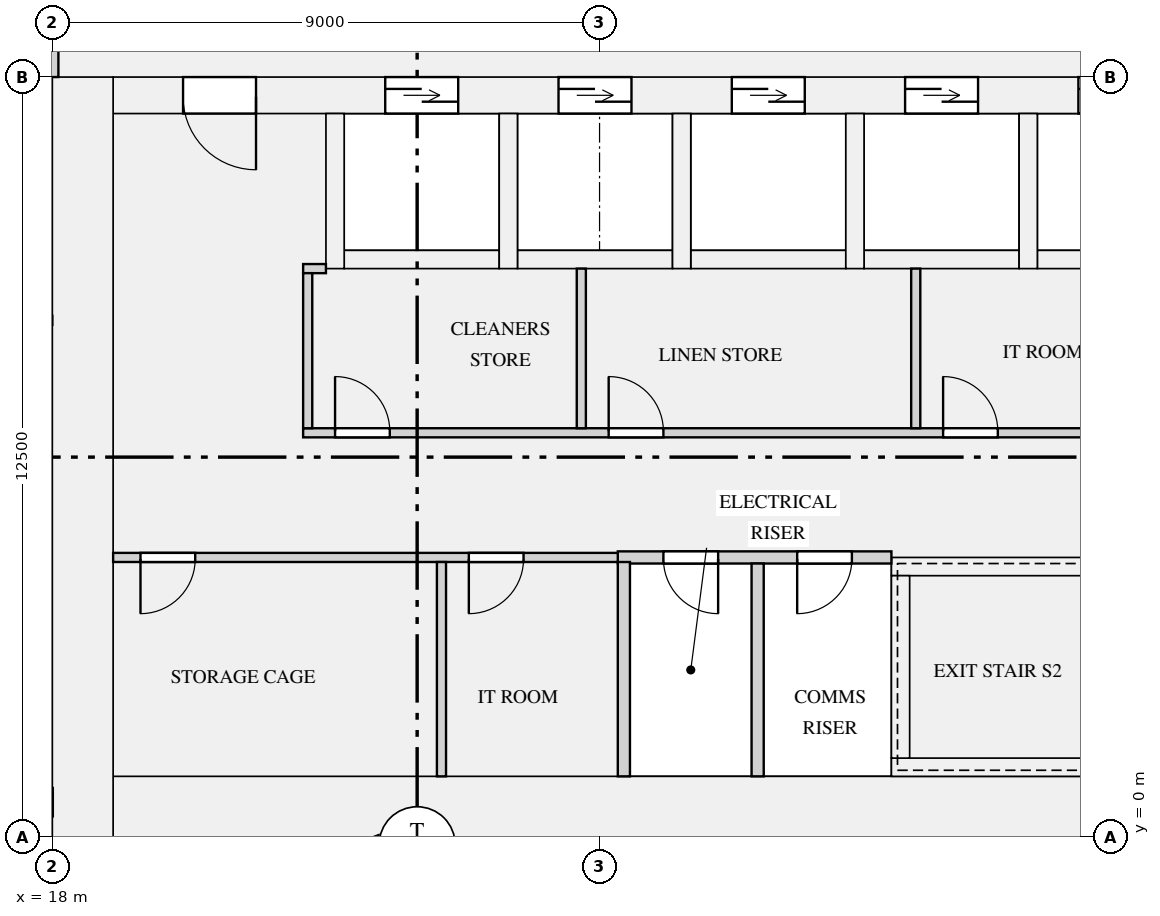
"""IFC4 building model, lengths in metres.
Left out: names, types, materials, properties, quantities, classifications, styles, units other than length and angle.
Written with IfcOpenShell. Run it as: python <this file> out.ifc"""

import sys

from ifc_helpers import new_model, si_unit, direction, frame, frame_2d, origin, place, context, subcontext, project, spatial, rectangle, extrude, element, fill, save


model = new_model("IFC4")
c1 = context("Model", 3, precision=1e-05, world=origin(), true_north=direction((0.0, 1.0)))
c2 = subcontext(c1, "Body", "Model", "MODEL_VIEW")
j1 = project(units=[si_unit("LENGTHUNIT", "METRE"), si_unit("PLANEANGLEUNIT", "RADIAN")], contexts=[c1])
p1 = place(None, origin())
s1 = spatial("IfcSite", under=j1, at=p1, CompositionType="ELEMENT")
p2 = place(p1, origin())
s2 = spatial("IfcBuilding", under=s1, at=p2, CompositionType="ELEMENT")
p3 = place(p2, frame((0.0, 0.0, 28.95)))
s3 = spatial("IfcBuildingStorey", under=s2, at=p3, CompositionType="ELEMENT", Elevation=28.95)
p4 = place(p3, frame((18.5, 0.0, 0.0), z_axis=(0.0, 0.0, 1.0), x_axis=(0.0, 1.0, 0.0)))
e1 = element("IfcWall", 1, at=p4, inside=s3, PredefinedType="SHEAR", context=c2, shape_type="SweptSolid", body=[
    extrude(rectangle(XDim=12.5, YDim=1.0, at=frame_2d((6.25, 0.0))), origin(), (0.0, 0.0, 1.0), 3.15),
])
p5 = place(p3, frame((19.0, 0.5, 0.0), z_axis=(0.0, 0.0, 1.0), x_axis=(1.0, 0.0, 0.0)))
e2 = element("IfcWall", 2, at=p5, inside=s3, PredefinedType="SHEAR", context=c2, shape_type="SweptSolid", body=[
    extrude(rectangle(XDim=34.0, YDim=1.0, at=frame_2d((17.0, 0.0))), origin(), (0.0, 0.0, 1.0), 3.15),
])
p6 = place(p3, frame((19.0, 12.2, 0.0), z_axis=(0.0, 0.0, 1.0), x_axis=(1.0, 0.0, 0.0)))
e3 = element("IfcWall", 3, at=p6, inside=s3, PredefinedType="SHEAR", context=c2, shape_type="SweptSolid", body=[
    extrude(rectangle(XDim=34.0, YDim=0.6, at=frame_2d((17.0, 0.0))), origin(), (0.0, 0.0, 1.0), 3.15),
])
p7 = place(p6, frame((4.475, 0.0, 0.0)))
e4 = element("IfcOpeningElement", 4, at=p7, cuts=e3, PredefinedType="OPENING", context=c2, shape_type="SweptSolid", body=[
    extrude(rectangle(XDim=1.2, YDim=2.1, at=frame_2d((0.6, 1.05))), frame((0.0, 0.31, 0.0), z_axis=(0.0, -1.0, 0.0), x_axis=(1.0, 0.0, 0.0)), (0.0, 0.0, 1.0), 0.62),
])
p8 = place(p6, frame((7.325, 0.0, 0.0)))
e5 = element("IfcOpeningElement", 5, at=p8, cuts=e3, PredefinedType="OPENING", context=c2, shape_type="SweptSolid", body=[
    extrude(rectangle(XDim=1.2, YDim=2.1, at=frame_2d((0.6, 1.05))), frame((0.0, 0.31, 0.0), z_axis=(0.0, -1.0, 0.0), x_axis=(1.0, 0.0, 0.0)), (0.0, 0.0, 1.0), 0.62),
])
p9 = place(p6, frame((10.175, 0.0, 0.0)))
e6 = element("IfcOpeningElement", 6, at=p9, cuts=e3, PredefinedType="OPENING", context=c2, shape_type="SweptSolid", body=[
    extrude(rectangle(XDim=1.2, YDim=2.1, at=frame_2d((0.6, 1.05))), frame((0.0, 0.31, 0.0), z_axis=(0.0, -1.0, 0.0), x_axis=(1.0, 0.0, 0.0)), (0.0, 0.0, 1.0), 0.62),
])
p10 = place(p6, frame((13.025, 0.0, 0.0)))
e7 = element("IfcOpeningElement", 7, at=p10, cuts=e3, PredefinedType="OPENING", context=c2, shape_type="SweptSolid", body=[
    extrude(rectangle(XDim=1.2, YDim=2.1, at=frame_2d((0.6, 1.05))), frame((0.0, 0.31, 0.0), z_axis=(0.0, -1.0, 0.0), x_axis=(1.0, 0.0, 0.0)), (0.0, 0.0, 1.0), 0.62),
])
p11 = place(p6, frame((15.875, 0.0, 0.0)))
e8 = element("IfcOpeningElement", 8, at=p11, cuts=e3, PredefinedType="OPENING", context=c2, shape_type="SweptSolid", body=[
    extrude(rectangle(XDim=1.2, YDim=2.1, at=frame_2d((0.6, 1.05))), frame((0.0, 0.31, 0.0), z_axis=(0.0, -1.0, 0.0), x_axis=(1.0, 0.0, 0.0)), (0.0, 0.0, 1.0), 0.62),
])
p12 = place(p6, frame((24.175, 0.0, 0.0)))
e9 = element("IfcOpeningElement", 9, at=p12, cuts=e3, PredefinedType="OPENING", context=c2, shape_type="SweptSolid", body=[
    extrude(rectangle(XDim=1.1, YDim=2.1, at=frame_2d((0.55, 1.05))), frame((0.0, 0.31, 0.0), z_axis=(0.0, -1.0, 0.0), x_axis=(1.0, 0.0, 0.0)), (0.0, 0.0, 1.0), 0.62),
])
p13 = place(p6, frame((26.425, 0.0, 0.0)))
e10 = element("IfcOpeningElement", 10, at=p13, cuts=e3, PredefinedType="OPENING", context=c2, shape_type="SweptSolid", body=[
    extrude(rectangle(XDim=1.1, YDim=2.1, at=frame_2d((0.55, 1.05))), frame((0.0, 0.31, 0.0), z_axis=(0.0, -1.0, 0.0), x_axis=(1.0, 0.0, 0.0)), (0.0, 0.0, 1.0), 0.62),
])
p14 = place(p6, frame((28.675, 0.0, 0.0)))
e11 = element("IfcOpeningElement", 11, at=p14, cuts=e3, PredefinedType="OPENING", context=c2, shape_type="SweptSolid", body=[
    extrude(rectangle(XDim=1.1, YDim=2.1, at=frame_2d((0.55, 1.05))), frame((0.0, 0.31, 0.0), z_axis=(0.0, -1.0, 0.0), x_axis=(1.0, 0.0, 0.0)), (0.0, 0.0, 1.0), 0.62),
])
p15 = place(p6, frame((1.15, 0.0, 0.0)))
e12 = element("IfcOpeningElement", 12, at=p15, cuts=e3, PredefinedType="OPENING", context=c2, shape_type="SweptSolid", body=[
    extrude(rectangle(XDim=1.2, YDim=2.1, at=frame_2d((0.6, 1.05))), frame((0.0, 0.31, 0.0), z_axis=(0.0, -1.0, 0.0), x_axis=(1.0, 0.0, 0.0)), (0.0, 0.0, 1.0), 0.62),
])
p16 = place(p6, frame((31.65, 0.0, 0.0)))
e13 = element("IfcOpeningElement", 13, at=p16, cuts=e3, PredefinedType="OPENING", context=c2, shape_type="SweptSolid", body=[
    extrude(rectangle(XDim=1.2, YDim=2.1, at=frame_2d((0.6, 1.05))), frame((0.0, 0.31, 0.0), z_axis=(0.0, -1.0, 0.0), x_axis=(1.0, 0.0, 0.0)), (0.0, 0.0, 1.0), 0.62),
])
p17 = place(p3, frame((22.8, 9.5, 0.0), z_axis=(0.0, 0.0, 1.0), x_axis=(1.0, 0.0, 0.0)))
e14 = element("IfcWall", 14, at=p17, inside=s3, PredefinedType="SHEAR", context=c2, shape_type="SweptSolid", body=[
    extrude(rectangle(XDim=2.55, YDim=0.3, at=frame_2d((1.275, 0.0))), origin(), (0.0, 0.0, 1.0), 3.15),
])
p18 = place(p3, frame((22.65, 9.35, 0.0), z_axis=(0.0, 0.0, 1.0), x_axis=(0.0, 1.0, 0.0)))
e15 = element("IfcWall", 15, at=p18, inside=s3, PredefinedType="SHEAR", context=c2, shape_type="SweptSolid", body=[
    extrude(rectangle(XDim=2.55, YDim=0.3, at=frame_2d((1.275, 0.0))), origin(), (0.0, 0.0, 1.0), 3.15),
])
p19 = place(p3, frame((25.65, 9.5, 0.0), z_axis=(0.0, 0.0, 1.0), x_axis=(1.0, 0.0, 0.0)))
e16 = element("IfcWall", 16, at=p19, inside=s3, PredefinedType="SHEAR", context=c2, shape_type="SweptSolid", body=[
    extrude(rectangle(XDim=2.55, YDim=0.3, at=frame_2d((1.275, 0.0))), origin(), (0.0, 0.0, 1.0), 3.15),
])
p20 = place(p3, frame((25.5, 9.35, 0.0), z_axis=(0.0, 0.0, 1.0), x_axis=(0.0, 1.0, 0.0)))
e17 = element("IfcWall", 17, at=p20, inside=s3, PredefinedType="SHEAR", context=c2, shape_type="SweptSolid", body=[
    extrude(rectangle(XDim=2.55, YDim=0.3, at=frame_2d((1.275, 0.0))), origin(), (0.0, 0.0, 1.0), 3.15),
])
p21 = place(p3, frame((28.5, 9.5, 0.0), z_axis=(0.0, 0.0, 1.0), x_axis=(1.0, 0.0, 0.0)))
e18 = element("IfcWall", 18, at=p21, inside=s3, PredefinedType="SHEAR", context=c2, shape_type="SweptSolid", body=[
    extrude(rectangle(XDim=2.55, YDim=0.3, at=frame_2d((1.275, 0.0))), origin(), (0.0, 0.0, 1.0), 3.15),
])
for number, where, z_axis, x_axis in (
    (19, (28.35, 9.35, 0.0), (0.0, 0.0, 1.0), (0.0, 1.0, 0.0)),
    (20, (31.35, 9.5, 0.0), (0.0, 0.0, 1.0), (1.0, 0.0, 0.0)),
    (21, (31.2, 9.35, 0.0), (0.0, 0.0, 1.0), (0.0, 1.0, 0.0)),
):
    element("IfcWall", number, at=place(p3, frame(where, z_axis=z_axis, x_axis=x_axis)), inside=s3, PredefinedType="SHEAR", context=c2, shape_type="SweptSolid", body=[
        extrude(rectangle(XDim=2.55, YDim=0.3, at=frame_2d((1.275, 0.0))), origin(), (0.0, 0.0, 1.0), 3.15),
    ])
p22 = place(p3, frame((34.2, 9.5, 0.0), z_axis=(0.0, 0.0, 1.0), x_axis=(1.0, 0.0, 0.0)))
e22 = element("IfcWall", 22, at=p22, inside=s3, PredefinedType="SHEAR", context=c2, shape_type="SweptSolid", body=[
    extrude(rectangle(XDim=2.55, YDim=0.3, at=frame_2d((1.275, 0.0))), origin(), (0.0, 0.0, 1.0), 3.15),
])
p23 = place(p3, frame((34.05, 9.35, 0.0), z_axis=(0.0, 0.0, 1.0), x_axis=(0.0, 1.0, 0.0)))
e23 = element("IfcWall", 23, at=p23, inside=s3, PredefinedType="SHEAR", context=c2, shape_type="SweptSolid", body=[
    extrude(rectangle(XDim=2.55, YDim=0.3, at=frame_2d((1.275, 0.0))), origin(), (0.0, 0.0, 1.0), 3.15),
])
p24 = place(p3, frame((31.8, 1.15, 0.0), z_axis=(0.0, 0.0, 1.0), x_axis=(1.0, 0.0, 0.0)))
e24 = element("IfcWall", 24, at=p24, inside=s3, PredefinedType="SHEAR", context=c2, shape_type="SweptSolid", body=[
    extrude(rectangle(XDim=8.4, YDim=0.3, at=frame_2d((4.2, 0.0))), origin(), (0.0, 0.0, 1.0), 3.15),
])
p25 = place(p3, frame((31.8, 4.45, 0.0), z_axis=(0.0, 0.0, 1.0), x_axis=(1.0, 0.0, 0.0)))
e25 = element("IfcWall", 25, at=p25, inside=s3, PredefinedType="SHEAR", context=c2, shape_type="SweptSolid", body=[
    extrude(rectangle(XDim=8.4, YDim=0.3, at=frame_2d((4.2, 0.0))), origin(), (0.0, 0.0, 1.0), 3.15),
])
p26 = place(p25, frame((6.8, 0.0, 0.0)))
e26 = element("IfcOpeningElement", 26, at=p26, cuts=e25, PredefinedType="OPENING", context=c2, shape_type="SweptSolid", body=[
    extrude(rectangle(XDim=1.1, YDim=2.1, at=frame_2d((0.55, 1.05))), frame((0.0, 0.16, 0.0), z_axis=(0.0, -1.0, 0.0), x_axis=(1.0, 0.0, 0.0)), (0.0, 0.0, 1.0), 0.32),
])
p27 = place(p3, frame((31.95, 1.3, 0.0), z_axis=(0.0, 0.0, 1.0), x_axis=(0.0, 1.0, 0.0)))
e27 = element("IfcWall", 27, at=p27, inside=s3, PredefinedType="SHEAR", context=c2, shape_type="SweptSolid", body=[
    extrude(rectangle(XDim=3.0, YDim=0.3, at=frame_2d((1.5, 0.0))), origin(), (0.0, 0.0, 1.0), 3.15),
])
p28 = place(p3, frame((27.3, 4.6, 0.0), z_axis=(0.0, 0.0, 1.0), x_axis=(1.0, 0.0, 0.0)))
e28 = element("IfcWall", 28, at=p28, inside=s3, PredefinedType="PARTITIONING", context=c2, shape_type="SweptSolid", body=[
    extrude(rectangle(XDim=4.5, YDim=0.2, at=frame_2d((2.25, 0.0))), origin(), (0.0, 0.0, 1.0), 2.83),
])
p29 = place(p28, frame((0.75, 0.0, 0.0)))
e29 = element("IfcOpeningElement", 29, at=p29, cuts=e28, PredefinedType="OPENING", context=c2, shape_type="SweptSolid", body=[
    extrude(rectangle(XDim=0.9, YDim=2.1, at=frame_2d((0.45, 1.05))), frame((0.0, 0.11, 0.0), z_axis=(0.0, -1.0, 0.0), x_axis=(1.0, 0.0, 0.0)), (0.0, 0.0, 1.0), 0.22),
])
p30 = place(p28, frame((2.95, 0.0, 0.0)))
e30 = element("IfcOpeningElement", 30, at=p30, cuts=e28, PredefinedType="OPENING", context=c2, shape_type="SweptSolid", body=[
    extrude(rectangle(XDim=0.9, YDim=2.1, at=frame_2d((0.45, 1.05))), frame((0.0, 0.11, 0.0), z_axis=(0.0, -1.0, 0.0), x_axis=(1.0, 0.0, 0.0)), (0.0, 0.0, 1.0), 0.22),
])
p31 = place(p3, frame((19.0, 4.6, 0.0), z_axis=(0.0, 0.0, 1.0), x_axis=(1.0, 0.0, 0.0)))
e31 = element("IfcWall", 31, at=p31, inside=s3, PredefinedType="PARTITIONING", context=c2, shape_type="SweptSolid", body=[
    extrude(rectangle(XDim=8.3, YDim=0.15, at=frame_2d((4.15, 0.0))), origin(), (0.0, 0.0, 1.0), 2.83),
])
p32 = place(p31, frame((0.45, 0.0, 0.0)))
e32 = element("IfcOpeningElement", 32, at=p32, cuts=e31, PredefinedType="OPENING", context=c2, shape_type="SweptSolid", body=[
    extrude(rectangle(XDim=0.9, YDim=2.1, at=frame_2d((0.45, 1.05))), frame((0.0, 0.085, 0.0), z_axis=(0.0, -1.0, 0.0), x_axis=(1.0, 0.0, 0.0)), (0.0, 0.0, 1.0), 0.17),
])
p33 = place(p31, frame((5.85, 0.0, 0.0)))
e33 = element("IfcOpeningElement", 33, at=p33, cuts=e31, PredefinedType="OPENING", context=c2, shape_type="SweptSolid", body=[
    extrude(rectangle(XDim=0.9, YDim=2.1, at=frame_2d((0.45, 1.05))), frame((0.0, 0.085, 0.0), z_axis=(0.0, -1.0, 0.0), x_axis=(1.0, 0.0, 0.0)), (0.0, 0.0, 1.0), 0.17),
])
p34 = place(p3, frame((22.125, 6.65, 0.0), z_axis=(0.0, 0.0, 1.0), x_axis=(1.0, 0.0, 0.0)))
e34 = element("IfcWall", 34, at=p34, inside=s3, PredefinedType="PARTITIONING", context=c2, shape_type="SweptSolid", body=[
    extrude(rectangle(XDim=20.4, YDim=0.15, at=frame_2d((10.2, 0.0))), origin(), (0.0, 0.0, 1.0), 2.83),
])
p35 = place(p34, frame((0.525, 0.0, 0.0)))
e35 = element("IfcOpeningElement", 35, at=p35, cuts=e34, PredefinedType="OPENING", context=c2, shape_type="SweptSolid", body=[
    extrude(rectangle(XDim=0.9, YDim=2.1, at=frame_2d((0.45, 1.05))), frame((0.0, 0.085, 0.0), z_axis=(0.0, -1.0, 0.0), x_axis=(1.0, 0.0, 0.0)), (0.0, 0.0, 1.0), 0.17),
])
p36 = place(p34, frame((5.025, 0.0, 0.0)))
e36 = element("IfcOpeningElement", 36, at=p36, cuts=e34, PredefinedType="OPENING", context=c2, shape_type="SweptSolid", body=[
    extrude(rectangle(XDim=0.9, YDim=2.1, at=frame_2d((0.45, 1.05))), frame((0.0, 0.085, 0.0), z_axis=(0.0, -1.0, 0.0), x_axis=(1.0, 0.0, 0.0)), (0.0, 0.0, 1.0), 0.17),
])
p37 = place(p34, frame((10.525, 0.0, 0.0)))
e37 = element("IfcOpeningElement", 37, at=p37, cuts=e34, PredefinedType="OPENING", context=c2, shape_type="SweptSolid", body=[
    extrude(rectangle(XDim=0.9, YDim=2.1, at=frame_2d((0.45, 1.05))), frame((0.0, 0.085, 0.0), z_axis=(0.0, -1.0, 0.0), x_axis=(1.0, 0.0, 0.0)), (0.0, 0.0, 1.0), 0.17),
])
p38 = place(p34, frame((14.025, 0.0, 0.0)))
e38 = element("IfcOpeningElement", 38, at=p38, cuts=e34, PredefinedType="OPENING", context=c2, shape_type="SweptSolid", body=[
    extrude(rectangle(XDim=0.9, YDim=2.1, at=frame_2d((0.45, 1.05))), frame((0.0, 0.085, 0.0), z_axis=(0.0, -1.0, 0.0), x_axis=(1.0, 0.0, 0.0)), (0.0, 0.0, 1.0), 0.17),
])
p39 = place(p34, frame((18.775, 0.0, 0.0)))
e39 = element("IfcOpeningElement", 39, at=p39, cuts=e34, PredefinedType="OPENING", context=c2, shape_type="SweptSolid", body=[
    extrude(rectangle(XDim=0.9, YDim=2.1, at=frame_2d((0.45, 1.05))), frame((0.0, 0.085, 0.0), z_axis=(0.0, -1.0, 0.0), x_axis=(1.0, 0.0, 0.0)), (0.0, 0.0, 1.0), 0.17),
])
p40 = place(p3, frame((22.125, 9.35, 0.0), z_axis=(0.0, 0.0, 1.0), x_axis=(1.0, 0.0, 0.0)))
e40 = element("IfcWall", 40, at=p40, inside=s3, PredefinedType="PARTITIONING", context=c2, shape_type="SweptSolid", body=[
    extrude(rectangle(XDim=0.375, YDim=0.15, at=frame_2d((0.188, 0.0))), origin(), (0.0, 0.0, 1.0), 2.83),
])
p41 = place(p3, frame((24.4, 1.0, 0.0), z_axis=(0.0, 0.0, 1.0), x_axis=(0.0, 1.0, 0.0)))
e41 = element("IfcWall", 41, at=p41, inside=s3, PredefinedType="PARTITIONING", context=c2, shape_type="SweptSolid", body=[
    extrude(rectangle(XDim=3.525, YDim=0.15, at=frame_2d((1.762, 0.0))), origin(), (0.0, 0.0, 1.0), 2.83),
])
p42 = place(p3, frame((27.4, 1.0, 0.0), z_axis=(0.0, 0.0, 1.0), x_axis=(0.0, 1.0, 0.0)))
e42 = element("IfcWall", 42, at=p42, inside=s3, PredefinedType="PARTITIONING", context=c2, shape_type="SweptSolid", body=[
    extrude(rectangle(XDim=3.525, YDim=0.2, at=frame_2d((1.762, 0.0))), origin(), (0.0, 0.0, 1.0), 2.83),
])
p43 = place(p3, frame((29.6, 1.0, 0.0), z_axis=(0.0, 0.0, 1.0), x_axis=(0.0, 1.0, 0.0)))
e43 = element("IfcWall", 43, at=p43, inside=s3, PredefinedType="PARTITIONING", context=c2, shape_type="SweptSolid", body=[
    extrude(rectangle(XDim=3.5, YDim=0.2, at=frame_2d((1.75, 0.0))), origin(), (0.0, 0.0, 1.0), 2.83),
])
p44 = place(p3, frame((22.2, 6.725, 0.0), z_axis=(0.0, 0.0, 1.0), x_axis=(0.0, 1.0, 0.0)))
e44 = element("IfcWall", 44, at=p44, inside=s3, PredefinedType="PARTITIONING", context=c2, shape_type="SweptSolid", body=[
    extrude(rectangle(XDim=2.55, YDim=0.15, at=frame_2d((1.275, 0.0))), origin(), (0.0, 0.0, 1.0), 2.83),
])
for number, where, z_axis, x_axis in (
    (45, (26.7, 6.725, 0.0), (0.0, 0.0, 1.0), (0.0, 1.0, 0.0)),
    (46, (32.2, 6.725, 0.0), (0.0, 0.0, 1.0), (0.0, 1.0, 0.0)),
):
    element("IfcWall", number, at=place(p3, frame(where, z_axis=z_axis, x_axis=x_axis)), inside=s3, PredefinedType="PARTITIONING", context=c2, shape_type="SweptSolid", body=[
        extrude(rectangle(XDim=2.625, YDim=0.15, at=frame_2d((1.312, 0.0))), origin(), (0.0, 0.0, 1.0), 2.83),
    ])
p45 = place(p3, frame((18.0, 12.5, 0.0), z_axis=(0.0, 0.0, 1.0), x_axis=(0.0, 1.0, 0.0)))
e47 = element("IfcWall", 47, at=p45, inside=s3, PredefinedType="PARTITIONING", context=c2, shape_type="SweptSolid", body=[
    extrude(rectangle(XDim=3.4, YDim=0.2, at=frame_2d((1.7, 0.0))), origin(), (0.0, 0.0, 1.0), 2.83),
])
p46 = place(p7, origin())
e48 = element("IfcDoor", 48, at=p46, inside=s3, OperationType="DOUBLE_DOOR_SLIDING", PredefinedType="DOOR", context=c2, shape_type="SweptSolid", body=[
    extrude(rectangle(XDim=1.2, YDim=2.1, at=frame_2d((0.6, 1.05))), frame((0.0, 0.025, 0.0), z_axis=(0.0, -1.0, 0.0), x_axis=(1.0, 0.0, 0.0)), (0.0, 0.0, 1.0), 0.05),
])
fill(e4, e48)
p47 = place(p8, origin())
e49 = element("IfcDoor", 49, at=p47, inside=s3, OperationType="DOUBLE_DOOR_SLIDING", PredefinedType="DOOR", context=c2, shape_type="SweptSolid", body=[
    extrude(rectangle(XDim=1.2, YDim=2.1, at=frame_2d((0.6, 1.05))), frame((0.0, 0.025, 0.0), z_axis=(0.0, -1.0, 0.0), x_axis=(1.0, 0.0, 0.0)), (0.0, 0.0, 1.0), 0.05),
])
fill(e5, e49)
p48 = place(p9, origin())
e50 = element("IfcDoor", 50, at=p48, inside=s3, OperationType="DOUBLE_DOOR_SLIDING", PredefinedType="DOOR", context=c2, shape_type="SweptSolid", body=[
    extrude(rectangle(XDim=1.2, YDim=2.1, at=frame_2d((0.6, 1.05))), frame((0.0, 0.025, 0.0), z_axis=(0.0, -1.0, 0.0), x_axis=(1.0, 0.0, 0.0)), (0.0, 0.0, 1.0), 0.05),
])
fill(e6, e50)
p49 = place(p10, origin())
e51 = element("IfcDoor", 51, at=p49, inside=s3, OperationType="DOUBLE_DOOR_SLIDING", PredefinedType="DOOR", context=c2, shape_type="SweptSolid", body=[
    extrude(rectangle(XDim=1.2, YDim=2.1, at=frame_2d((0.6, 1.05))), frame((0.0, 0.025, 0.0), z_axis=(0.0, -1.0, 0.0), x_axis=(1.0, 0.0, 0.0)), (0.0, 0.0, 1.0), 0.05),
])
fill(e7, e51)
p50 = place(p11, origin())
e52 = element("IfcDoor", 52, at=p50, inside=s3, OperationType="DOUBLE_DOOR_SLIDING", PredefinedType="DOOR", context=c2, shape_type="SweptSolid", body=[
    extrude(rectangle(XDim=1.2, YDim=2.1, at=frame_2d((0.6, 1.05))), frame((0.0, 0.025, 0.0), z_axis=(0.0, -1.0, 0.0), x_axis=(1.0, 0.0, 0.0)), (0.0, 0.0, 1.0), 0.05),
])
fill(e8, e52)
p51 = place(p35, origin())
e53 = element("IfcDoor", 53, at=p51, inside=s3, OperationType="SINGLE_SWING_LEFT", PredefinedType="DOOR", context=c2, shape_type="SweptSolid", body=[
    extrude(rectangle(XDim=0.9, YDim=2.1, at=frame_2d((0.45, 1.05))), frame((0.0, 0.025, 0.0), z_axis=(0.0, -1.0, 0.0), x_axis=(1.0, 0.0, 0.0)), (0.0, 0.0, 1.0), 0.05),
])
fill(e35, e53)
p52 = place(p36, origin())
e54 = element("IfcDoor", 54, at=p52, inside=s3, OperationType="SINGLE_SWING_LEFT", PredefinedType="DOOR", context=c2, shape_type="SweptSolid", body=[
    extrude(rectangle(XDim=0.9, YDim=2.1, at=frame_2d((0.45, 1.05))), frame((0.0, 0.025, 0.0), z_axis=(0.0, -1.0, 0.0), x_axis=(1.0, 0.0, 0.0)), (0.0, 0.0, 1.0), 0.05),
])
fill(e36, e54)
p53 = place(p37, origin())
e55 = element("IfcDoor", 55, at=p53, inside=s3, OperationType="SINGLE_SWING_LEFT", PredefinedType="DOOR", context=c2, shape_type="SweptSolid", body=[
    extrude(rectangle(XDim=0.9, YDim=2.1, at=frame_2d((0.45, 1.05))), frame((0.0, 0.025, 0.0), z_axis=(0.0, -1.0, 0.0), x_axis=(1.0, 0.0, 0.0)), (0.0, 0.0, 1.0), 0.05),
])
fill(e37, e55)
p54 = place(p32, frame((0.9, 0.0, 0.0), z_axis=(0.0, 0.0, 1.0), x_axis=(-1.0, 0.0, 0.0)))
e56 = element("IfcDoor", 56, at=p54, inside=s3, OperationType="SINGLE_SWING_RIGHT", PredefinedType="DOOR", context=c2, shape_type="SweptSolid", body=[
    extrude(rectangle(XDim=0.9, YDim=2.1, at=frame_2d((0.45, 1.05))), frame((0.0, 0.025, 0.0), z_axis=(0.0, -1.0, 0.0), x_axis=(1.0, 0.0, 0.0)), (0.0, 0.0, 1.0), 0.05),
])
fill(e32, e56)
p55 = place(p33, frame((0.9, 0.0, 0.0), z_axis=(0.0, 0.0, 1.0), x_axis=(-1.0, 0.0, 0.0)))
e57 = element("IfcDoor", 57, at=p55, inside=s3, OperationType="SINGLE_SWING_RIGHT", PredefinedType="DOOR", context=c2, shape_type="SweptSolid", body=[
    extrude(rectangle(XDim=0.9, YDim=2.1, at=frame_2d((0.45, 1.05))), frame((0.0, 0.025, 0.0), z_axis=(0.0, -1.0, 0.0), x_axis=(1.0, 0.0, 0.0)), (0.0, 0.0, 1.0), 0.05),
])
fill(e33, e57)
p56 = place(p29, frame((0.9, 0.0, 0.0), z_axis=(0.0, 0.0, 1.0), x_axis=(-1.0, 0.0, 0.0)))
e58 = element("IfcDoor", 58, at=p56, inside=s3, OperationType="SINGLE_SWING_LEFT", PredefinedType="DOOR", context=c2, shape_type="SweptSolid", body=[
    extrude(rectangle(XDim=0.9, YDim=2.1, at=frame_2d((0.45, 1.05))), frame((0.0, 0.025, 0.0), z_axis=(0.0, -1.0, 0.0), x_axis=(1.0, 0.0, 0.0)), (0.0, 0.0, 1.0), 0.05),
])
fill(e29, e58)
p57 = place(p30, frame((0.9, 0.0, 0.0), z_axis=(0.0, 0.0, 1.0), x_axis=(-1.0, 0.0, 0.0)))
e59 = element("IfcDoor", 59, at=p57, inside=s3, OperationType="SINGLE_SWING_RIGHT", PredefinedType="DOOR", context=c2, shape_type="SweptSolid", body=[
    extrude(rectangle(XDim=0.9, YDim=2.1, at=frame_2d((0.45, 1.05))), frame((0.0, 0.025, 0.0), z_axis=(0.0, -1.0, 0.0), x_axis=(1.0, 0.0, 0.0)), (0.0, 0.0, 1.0), 0.05),
])
fill(e30, e59)
p58 = place(p15, frame((1.2, 0.0, 0.0), z_axis=(0.0, 0.0, 1.0), x_axis=(-1.0, 0.0, 0.0)))
e60 = element("IfcDoor", 60, at=p58, inside=s3, OperationType="SINGLE_SWING_LEFT", PredefinedType="DOOR", context=c2, shape_type="SweptSolid", body=[
    extrude(rectangle(XDim=1.2, YDim=2.1, at=frame_2d((0.6, 1.05))), frame((0.0, 0.025, 0.0), z_axis=(0.0, -1.0, 0.0), x_axis=(1.0, 0.0, 0.0)), (0.0, 0.0, 1.0), 0.05),
])
fill(e12, e60)
save(model, sys.argv[1])
